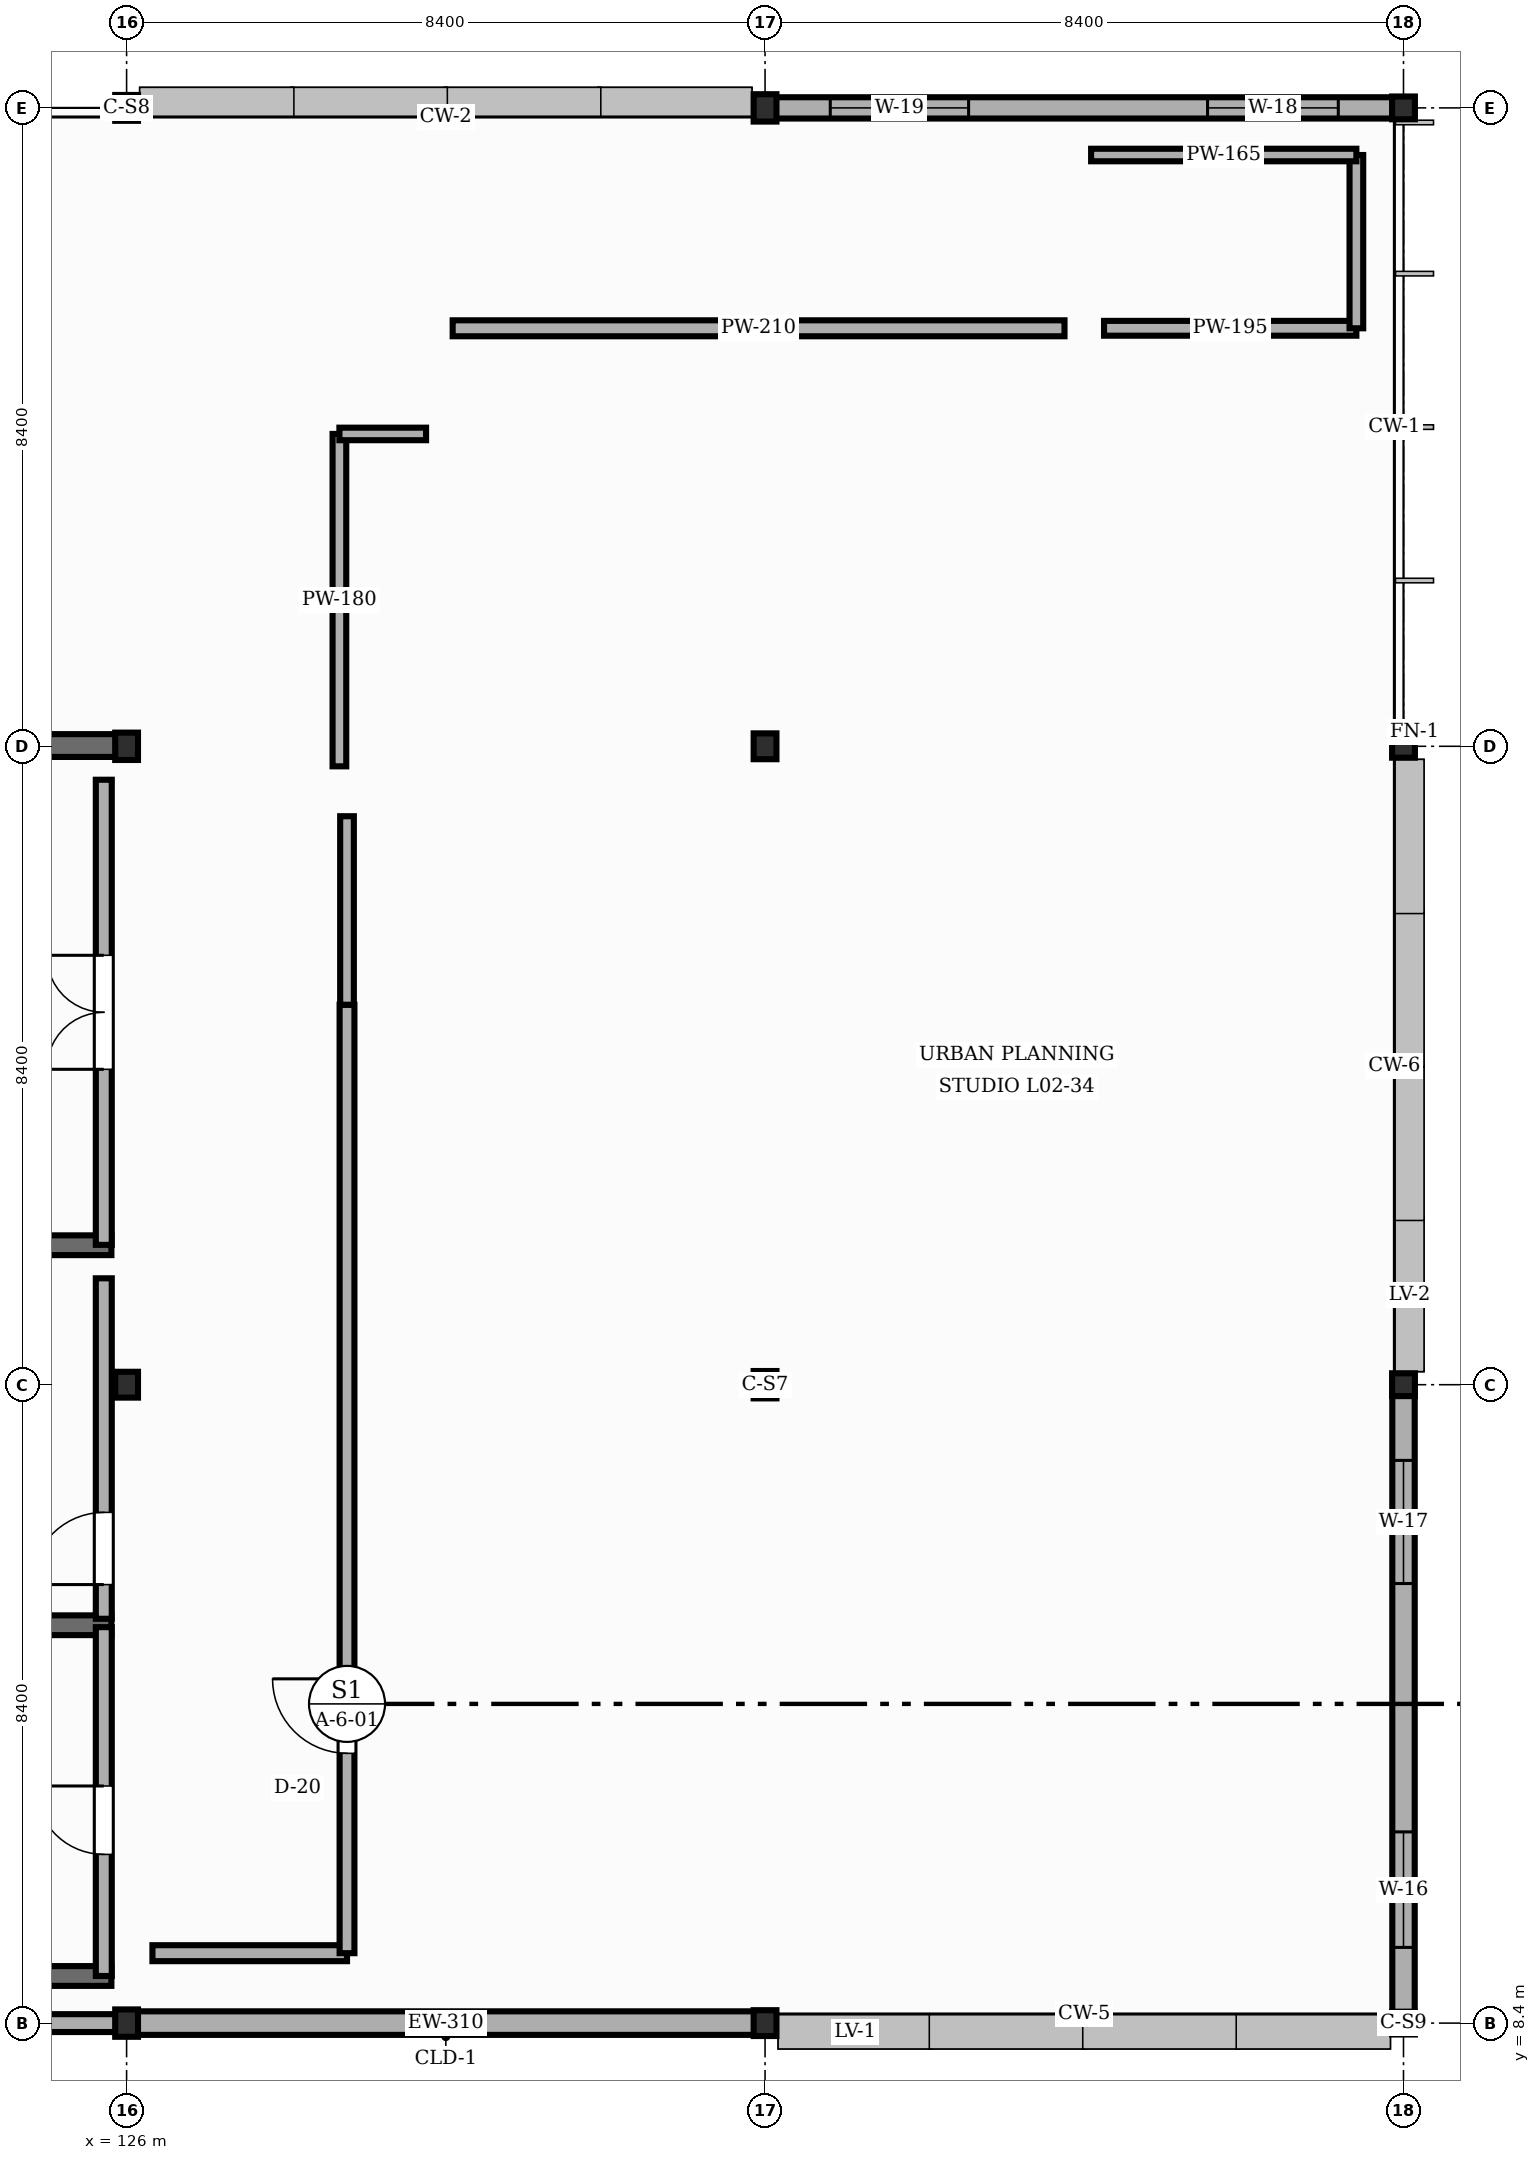
"""IFC4 building model, lengths in metres.
Left out: names, types, materials, properties, quantities, classifications, styles, units other than length and angle.
Written with IfcOpenShell. Run it as: python <this file> out.ifc"""

import sys

from ifc_helpers import new_model, si_unit, direction, frame, frame_2d, origin, origin_2d, place, context, subcontext, project, spatial, rectangle, i_section, extrude, element, fill, save


model = new_model("IFC4")
c1 = context("Model", 3, precision=1e-05, world=origin(), true_north=direction((0.0, 1.0)))
c2 = subcontext(c1, "Body", "Model", "MODEL_VIEW")
j1 = project(units=[si_unit("LENGTHUNIT", "METRE"), si_unit("PLANEANGLEUNIT", "RADIAN")], contexts=[c1])
p1 = place(None, origin())
s1 = spatial("IfcSite", under=j1, at=p1, CompositionType="ELEMENT")
p2 = place(p1, origin())
s2 = spatial("IfcBuilding", under=s1, at=p2, CompositionType="ELEMENT")
p3 = place(p2, frame((0.0, 0.0, 9.9)))
s3 = spatial("IfcBuildingStorey", under=s2, at=p3, CompositionType="ELEMENT", Elevation=9.9)
p4 = place(p3, frame((126.0, 8.4, 0.0), z_axis=(0.0, 0.0, 1.0), x_axis=(1.0, 0.0, 0.0)))
e1 = element("IfcColumn", 1, at=p4, inside=s3, PredefinedType="COLUMN", context=c2, shape_type="SweptSolid", body=[
    extrude(i_section(OverallWidth=0.3, OverallDepth=0.36, WebThickness=0.012, FlangeThickness=0.022, FilletRadius=0.027, at=origin_2d()), origin(), (0.0, 0.0, 1.0), 4.05),
])
p5 = place(p3, frame((126.0, 16.8, 0.0), z_axis=(0.0, 0.0, 1.0), x_axis=(1.0, 0.0, 0.0)))
e2 = element("IfcColumn", 2, at=p5, inside=s3, PredefinedType="COLUMN", context=c2, shape_type="SweptSolid", body=[
    extrude(i_section(OverallWidth=0.3, OverallDepth=0.34, WebThickness=0.012, FlangeThickness=0.021, FilletRadius=0.027, at=origin_2d()), origin(), (0.0, 0.0, 1.0), 4.05),
])
p6 = place(p3, frame((126.0, 25.2, 0.0), z_axis=(0.0, 0.0, 1.0), x_axis=(1.0, 0.0, 0.0)))
e3 = element("IfcColumn", 3, at=p6, inside=s3, PredefinedType="COLUMN", context=c2, shape_type="SweptSolid", body=[
    extrude(i_section(OverallWidth=0.3, OverallDepth=0.36, WebThickness=0.012, FlangeThickness=0.022, FilletRadius=0.027, at=origin_2d()), origin(), (0.0, 0.0, 1.0), 4.05),
])
for number, where, z_axis, x_axis in (
    (4, (126.0, 33.6, 0.0), (0.0, 0.0, 1.0), (1.0, 0.0, 0.0)),
    (5, (134.4, 8.4, 0.0), (0.0, 0.0, 1.0), (1.0, 0.0, 0.0)),
):
    element("IfcColumn", number, at=place(p3, frame(where, z_axis=z_axis, x_axis=x_axis)), inside=s3, PredefinedType="COLUMN", context=c2, shape_type="SweptSolid", body=[
        extrude(i_section(OverallWidth=0.3, OverallDepth=0.34, WebThickness=0.012, FlangeThickness=0.021, FilletRadius=0.027, at=origin_2d()), origin(), (0.0, 0.0, 1.0), 4.05),
    ])
p7 = place(p3, frame((134.4, 16.8, 0.0), z_axis=(0.0, 0.0, 1.0), x_axis=(1.0, 0.0, 0.0)))
e6 = element("IfcColumn", 6, at=p7, inside=s3, PredefinedType="COLUMN", context=c2, shape_type="SweptSolid", body=[
    extrude(i_section(OverallWidth=0.3, OverallDepth=0.36, WebThickness=0.012, FlangeThickness=0.022, FilletRadius=0.027, at=origin_2d()), origin(), (0.0, 0.0, 1.0), 4.05),
])
p8 = place(p3, frame((134.4, 25.2, 0.0), z_axis=(0.0, 0.0, 1.0), x_axis=(1.0, 0.0, 0.0)))
e7 = element("IfcColumn", 7, at=p8, inside=s3, PredefinedType="COLUMN", context=c2, shape_type="SweptSolid", body=[
    extrude(i_section(OverallWidth=0.3, OverallDepth=0.34, WebThickness=0.012, FlangeThickness=0.021, FilletRadius=0.027, at=origin_2d()), origin(), (0.0, 0.0, 1.0), 4.05),
])
p9 = place(p3, frame((134.4, 33.6, 0.0), z_axis=(0.0, 0.0, 1.0), x_axis=(1.0, 0.0, 0.0)))
e8 = element("IfcColumn", 8, at=p9, inside=s3, PredefinedType="COLUMN", context=c2, shape_type="SweptSolid", body=[
    extrude(i_section(OverallWidth=0.3, OverallDepth=0.36, WebThickness=0.012, FlangeThickness=0.022, FilletRadius=0.027, at=origin_2d()), origin(), (0.0, 0.0, 1.0), 4.05),
])
for number, where, z_axis, x_axis in (
    (9, (142.8, 8.4, 0.0), (0.0, 0.0, 1.0), (1.0, 0.0, 0.0)),
    (10, (142.8, 16.8, 0.0), (0.0, 0.0, 1.0), (1.0, 0.0, 0.0)),
    (11, (142.8, 25.2, 0.0), (0.0, 0.0, 1.0), (1.0, 0.0, 0.0)),
    (12, (142.8, 33.6, 0.0), (0.0, 0.0, 1.0), (1.0, 0.0, 0.0)),
):
    element("IfcColumn", number, at=place(p3, frame(where, z_axis=z_axis, x_axis=x_axis)), inside=s3, PredefinedType="COLUMN", context=c2, shape_type="SweptSolid", body=[
        extrude(i_section(OverallWidth=0.3, OverallDepth=0.3, WebThickness=0.011, FlangeThickness=0.019, FilletRadius=0.027, at=origin_2d()), origin(), (0.0, 0.0, 1.0), 4.05),
    ])
p10 = place(p3, frame((117.608, 8.4, 0.0), z_axis=(0.0, 0.0, 1.0), x_axis=(1.0, 0.0, 0.0)))
e13 = element("IfcWall", 13, at=p10, inside=s3, PredefinedType="STANDARD", context=c2, shape_type="SweptSolid", body=[
    extrude(rectangle(XDim=8.384, YDim=0.235, at=frame_2d((4.192, 0.0))), origin(), (0.0, 0.0, 1.0), 3.502),
])
p11 = place(p3, frame((126.008, 8.4, 0.0), z_axis=(0.0, 0.0, 1.0), x_axis=(1.0, 0.0, 0.0)))
e14 = element("IfcWall", 14, at=p11, inside=s3, PredefinedType="STANDARD", context=c2, shape_type="SweptSolid", body=[
    extrude(rectangle(XDim=8.384, YDim=0.31, at=frame_2d((4.192, 0.0))), origin(), (0.0, 0.0, 1.0), 3.472),
])
p12 = place(p3, frame((142.8, 8.546, 0.0), z_axis=(0.0, 0.0, 1.0), x_axis=(0.0, 1.0, 0.0)))
e15 = element("IfcWall", 15, at=p12, inside=s3, PredefinedType="STANDARD", context=c2, shape_type="SweptSolid", body=[
    extrude(rectangle(XDim=8.108, YDim=0.295, at=frame_2d((4.054, 0.0))), origin(), (0.0, 0.0, 1.0), 3.472),
])
p13 = place(p12, frame((0.85, 0.0, 0.9)))
e16 = element("IfcOpeningElement", 16, at=p13, cuts=e15, PredefinedType="OPENING", context=c2, shape_type="SweptSolid", body=[
    extrude(rectangle(XDim=1.52, YDim=1.25, at=frame_2d((0.76, 0.625))), frame((0.0, 0.157, 0.0), z_axis=(0.0, -1.0, 0.0), x_axis=(1.0, 0.0, 0.0)), (0.0, 0.0, 1.0), 0.315),
])
p14 = place(p12, frame((5.638, 0.0, 0.9)))
e17 = element("IfcOpeningElement", 17, at=p14, cuts=e15, PredefinedType="OPENING", context=c2, shape_type="SweptSolid", body=[
    extrude(rectangle(XDim=1.62, YDim=1.25, at=frame_2d((0.81, 0.625))), frame((0.0, 0.157, 0.0), z_axis=(0.0, -1.0, 0.0), x_axis=(1.0, 0.0, 0.0)), (0.0, 0.0, 1.0), 0.315),
])
p15 = place(p3, frame((142.792, 33.6, 0.0), z_axis=(0.0, 0.0, 1.0), x_axis=(-1.0, 0.0, 0.0)))
e18 = element("IfcWall", 18, at=p15, inside=s3, PredefinedType="STANDARD", context=c2, shape_type="SweptSolid", body=[
    extrude(rectangle(XDim=8.384, YDim=0.28, at=frame_2d((4.192, 0.0))), origin(), (0.0, 0.0, 1.0), 3.472),
])
p16 = place(p15, frame((0.85, 0.0, 0.9)))
e19 = element("IfcOpeningElement", 19, at=p16, cuts=e18, PredefinedType="OPENING", context=c2, shape_type="SweptSolid", body=[
    extrude(rectangle(XDim=1.72, YDim=1.25, at=frame_2d((0.86, 0.625))), frame((0.0, 0.15, 0.0), z_axis=(0.0, -1.0, 0.0), x_axis=(1.0, 0.0, 0.0)), (0.0, 0.0, 1.0), 0.3),
])
p17 = place(p15, frame((5.714, 0.0, 0.9)))
e20 = element("IfcOpeningElement", 20, at=p17, cuts=e18, PredefinedType="OPENING", context=c2, shape_type="SweptSolid", body=[
    extrude(rectangle(XDim=1.82, YDim=1.25, at=frame_2d((0.91, 0.625))), frame((0.0, 0.15, 0.0), z_axis=(0.0, -1.0, 0.0), x_axis=(1.0, 0.0, 0.0)), (0.0, 0.0, 1.0), 0.3),
])
for number, where, z_axis, x_axis in (
    (21, (122.765, 9.02, 0.0), (0.0, 0.0, 1.0), (1.0, 0.0, 0.0)),
    (22, (122.765, 13.635, 0.0), (0.0, 0.0, 1.0), (1.0, 0.0, 0.0)),
    (23, (122.765, 18.635, 0.0), (0.0, 0.0, 1.0), (1.0, 0.0, 0.0)),
):
    element("IfcWall", number, at=place(p3, frame(where, z_axis=z_axis, x_axis=x_axis)), inside=s3, PredefinedType="SHEAR", context=c2, shape_type="SweptSolid", body=[
        extrude(rectangle(XDim=3.035, YDim=0.26, at=frame_2d((1.518, 0.0))), origin(), (0.0, 0.0, 1.0), 3.84),
    ])
p18 = place(p3, frame((121.15, 25.21, 0.0), z_axis=(0.0, 0.0, 1.0), x_axis=(1.0, 0.0, 0.0)))
e24 = element("IfcWall", 24, at=p18, inside=s3, PredefinedType="SHEAR", context=c2, shape_type="SweptSolid", body=[
    extrude(rectangle(XDim=4.87, YDim=0.3, at=frame_2d((2.435, 0.0))), origin(), (0.0, 0.0, 1.0), 3.84),
])
p19 = place(p3, frame((125.7, 9.02, 0.0), z_axis=(0.0, 0.0, 1.0), x_axis=(0.0, 1.0, 0.0)))
e25 = element("IfcWall", 25, at=p19, inside=s3, PredefinedType="STANDARD", context=c2, shape_type="SweptSolid", body=[
    extrude(rectangle(XDim=4.59, YDim=0.21, at=frame_2d((2.295, 0.0))), origin(), (0.0, 0.0, 1.0), 3.232),
])
p20 = place(p19, frame((1.6, 0.0, 0.0)))
e26 = element("IfcOpeningElement", 26, at=p20, cuts=e25, PredefinedType="OPENING", context=c2, shape_type="SweptSolid", body=[
    extrude(rectangle(XDim=0.9, YDim=2.1, at=frame_2d((0.45, 1.05))), frame((0.0, 0.115, 0.0), z_axis=(0.0, -1.0, 0.0), x_axis=(1.0, 0.0, 0.0)), (0.0, 0.0, 1.0), 0.23),
])
p21 = place(p3, frame((125.7, 13.72, 0.0), z_axis=(0.0, 0.0, 1.0), x_axis=(0.0, 1.0, 0.0)))
e27 = element("IfcWall", 27, at=p21, inside=s3, PredefinedType="STANDARD", context=c2, shape_type="SweptSolid", body=[
    extrude(rectangle(XDim=4.48, YDim=0.21, at=frame_2d((2.24, 0.0))), origin(), (0.0, 0.0, 1.0), 3.232),
])
p22 = place(p21, frame((0.45, 0.0, 0.0)))
e28 = element("IfcOpeningElement", 28, at=p22, cuts=e27, PredefinedType="OPENING", context=c2, shape_type="SweptSolid", body=[
    extrude(rectangle(XDim=0.95, YDim=2.15, at=frame_2d((0.475, 1.075))), frame((0.0, 0.115, 0.0), z_axis=(0.0, -1.0, 0.0), x_axis=(1.0, 0.0, 0.0)), (0.0, 0.0, 1.0), 0.23),
])
p23 = place(p3, frame((125.7, 18.64, 0.0), z_axis=(0.0, 0.0, 1.0), x_axis=(0.0, 1.0, 0.0)))
e29 = element("IfcWall", 29, at=p23, inside=s3, PredefinedType="STANDARD", context=c2, shape_type="SweptSolid", body=[
    extrude(rectangle(XDim=6.12, YDim=0.21, at=frame_2d((3.06, 0.0))), origin(), (0.0, 0.0, 1.0), 3.342),
])
p24 = place(p23, frame((2.31, 0.0, 0.0)))
e30 = element("IfcOpeningElement", 30, at=p24, cuts=e29, PredefinedType="OPENING", context=c2, shape_type="SweptSolid", body=[
    extrude(rectangle(XDim=1.5, YDim=2.2, at=frame_2d((0.75, 1.1))), frame((0.0, 0.115, 0.0), z_axis=(0.0, -1.0, 0.0), x_axis=(1.0, 0.0, 0.0)), (0.0, 0.0, 1.0), 0.23),
])
p25 = place(p3, frame((128.8, 24.936, -0.004), z_axis=(0.0, 0.0, 1.0), x_axis=(0.0, 1.0, 0.0)))
e31 = element("IfcWall", 31, at=p25, inside=s3, PredefinedType="STANDARD", context=c2, shape_type="SweptSolid", body=[
    extrude(rectangle(XDim=4.374, YDim=0.18, at=frame_2d((2.187, 0.0))), origin(), (0.0, 0.0, 1.0), 3.596),
])
p26 = place(p3, frame((128.8, 29.31, -0.004), z_axis=(0.0, 0.0, 1.0), x_axis=(1.0, 0.0, 0.0)))
e32 = element("IfcWall", 32, at=p26, inside=s3, PredefinedType="STANDARD", context=c2, shape_type="SweptSolid", body=[
    extrude(rectangle(XDim=1.14, YDim=0.165, at=frame_2d((0.57, 0.0))), origin(), (0.0, 0.0, 1.0), 3.844),
])
p27 = place(p3, frame((130.29, 30.7, -0.004), z_axis=(0.0, 0.0, 1.0), x_axis=(1.0, 0.0, 0.0)))
e33 = element("IfcWall", 33, at=p27, inside=s3, PredefinedType="STANDARD", context=c2, shape_type="SweptSolid", body=[
    extrude(rectangle(XDim=8.05, YDim=0.21, at=frame_2d((4.025, 0.0))), origin(), (0.0, 0.0, 1.0), 3.844),
])
p28 = place(p3, frame((138.86, 30.7, -0.004), z_axis=(0.0, 0.0, 1.0), x_axis=(1.0, 0.0, 0.0)))
e34 = element("IfcWall", 34, at=p28, inside=s3, PredefinedType="STANDARD", context=c2, shape_type="SweptSolid", body=[
    extrude(rectangle(XDim=3.32, YDim=0.195, at=frame_2d((1.66, 0.0))), origin(), (0.0, 0.0, 1.0), 3.844),
])
p29 = place(p3, frame((142.18, 30.7, -0.004), z_axis=(0.0, 0.0, 1.0), x_axis=(0.0, 1.0, 0.0)))
e35 = element("IfcWall", 35, at=p29, inside=s3, PredefinedType="STANDARD", context=c2, shape_type="SweptSolid", body=[
    extrude(rectangle(XDim=2.28, YDim=0.18, at=frame_2d((1.14, 0.0))), origin(), (0.0, 0.0, 1.0), 3.844),
])
p30 = place(p3, frame((142.18, 32.98, -0.004), z_axis=(0.0, 0.0, 1.0), x_axis=(-1.0, 0.0, 0.0)))
e36 = element("IfcWall", 36, at=p30, inside=s3, PredefinedType="STANDARD", context=c2, shape_type="SweptSolid", body=[
    extrude(rectangle(XDim=3.49, YDim=0.165, at=frame_2d((1.745, 0.0))), origin(), (0.0, 0.0, 1.0), 3.844),
])
p31 = place(p3, frame((126.34, 9.32, -0.004), z_axis=(0.0, 0.0, 1.0), x_axis=(1.0, 0.0, 0.0)))
e37 = element("IfcWall", 37, at=p31, inside=s3, PredefinedType="STANDARD", context=c2, shape_type="SweptSolid", body=[
    extrude(rectangle(XDim=2.56, YDim=0.21, at=frame_2d((1.28, 0.0))), origin(), (0.0, 0.0, 1.0), 3.844),
])
p32 = place(p3, frame((128.9, 9.32, -0.004), z_axis=(0.0, 0.0, 1.0), x_axis=(0.0, 1.0, 0.0)))
e38 = element("IfcWall", 38, at=p32, inside=s3, PredefinedType="STANDARD", context=c2, shape_type="SweptSolid", body=[
    extrude(rectangle(XDim=12.479, YDim=0.195, at=frame_2d((6.24, 0.0))), origin(), (0.0, 0.0, 1.0), 3.536),
])
p33 = place(p32, frame((2.63, 0.0, 0.0)))
e39 = element("IfcOpeningElement", 39, at=p33, cuts=e38, PredefinedType="OPENING", context=c2, shape_type="SweptSolid", body=[
    extrude(rectangle(XDim=0.98, YDim=2.22, at=frame_2d((0.49, 1.11))), frame((0.0, 0.107, 0.0), z_axis=(0.0, -1.0, 0.0), x_axis=(1.0, 0.0, 0.0)), (0.0, 0.0, 1.0), 0.215),
])
p34 = place(p3, frame((128.9, 21.799, -0.004), z_axis=(0.0, 0.0, 1.0), x_axis=(0.0, 1.0, 0.0)))
e40 = element("IfcWall", 40, at=p34, inside=s3, PredefinedType="STANDARD", context=c2, shape_type="SweptSolid", body=[
    extrude(rectangle(XDim=2.481, YDim=0.18, at=frame_2d((1.24, 0.0))), origin(), (0.0, 0.0, 1.0), 3.566),
])
p35 = place(p13, origin())
e41 = element("IfcWindow", 41, at=p35, inside=s3, PartitioningType="SINGLE_PANEL", PredefinedType="WINDOW", context=c2, shape_type="SweptSolid", body=[
    extrude(rectangle(XDim=1.52, YDim=1.25, at=frame_2d((0.76, 0.625))), frame((0.0, 0.03, 0.0), z_axis=(0.0, -1.0, 0.0), x_axis=(1.0, 0.0, 0.0)), (0.0, 0.0, 1.0), 0.06),
])
fill(e16, e41)
p36 = place(p14, origin())
e42 = element("IfcWindow", 42, at=p36, inside=s3, PartitioningType="SINGLE_PANEL", PredefinedType="WINDOW", context=c2, shape_type="SweptSolid", body=[
    extrude(rectangle(XDim=1.62, YDim=1.25, at=frame_2d((0.81, 0.625))), frame((0.0, 0.03, 0.0), z_axis=(0.0, -1.0, 0.0), x_axis=(1.0, 0.0, 0.0)), (0.0, 0.0, 1.0), 0.06),
])
fill(e17, e42)
p37 = place(p16, origin())
e43 = element("IfcWindow", 43, at=p37, inside=s3, PartitioningType="SINGLE_PANEL", PredefinedType="WINDOW", context=c2, shape_type="SweptSolid", body=[
    extrude(rectangle(XDim=1.72, YDim=1.25, at=frame_2d((0.86, 0.625))), frame((0.0, 0.03, 0.0), z_axis=(0.0, -1.0, 0.0), x_axis=(1.0, 0.0, 0.0)), (0.0, 0.0, 1.0), 0.06),
])
fill(e19, e43)
p38 = place(p17, origin())
e44 = element("IfcWindow", 44, at=p38, inside=s3, PartitioningType="SINGLE_PANEL", PredefinedType="WINDOW", context=c2, shape_type="SweptSolid", body=[
    extrude(rectangle(XDim=1.82, YDim=1.25, at=frame_2d((0.91, 0.625))), frame((0.0, 0.03, 0.0), z_axis=(0.0, -1.0, 0.0), x_axis=(1.0, 0.0, 0.0)), (0.0, 0.0, 1.0), 0.06),
])
fill(e20, e44)
p39 = place(p20, origin())
e45 = element("IfcDoor", 45, at=p39, inside=s3, OperationType="SINGLE_SWING_RIGHT", PredefinedType="DOOR", context=c2, shape_type="SweptSolid", body=[
    extrude(rectangle(XDim=0.9, YDim=2.1, at=frame_2d((0.45, 1.05))), frame((0.0, 0.025, 0.0), z_axis=(0.0, -1.0, 0.0), x_axis=(1.0, 0.0, 0.0)), (0.0, 0.0, 1.0), 0.05),
])
fill(e26, e45)
p40 = place(p22, origin())
e46 = element("IfcDoor", 46, at=p40, inside=s3, OperationType="SINGLE_SWING_LEFT", PredefinedType="DOOR", context=c2, shape_type="SweptSolid", body=[
    extrude(rectangle(XDim=0.95, YDim=2.15, at=frame_2d((0.475, 1.075))), frame((0.0, 0.025, 0.0), z_axis=(0.0, -1.0, 0.0), x_axis=(1.0, 0.0, 0.0)), (0.0, 0.0, 1.0), 0.05),
])
fill(e28, e46)
p41 = place(p24, origin())
e47 = element("IfcDoor", 47, at=p41, inside=s3, OperationType="DOUBLE_DOOR_SINGLE_SWING", PredefinedType="DOOR", context=c2, shape_type="SweptSolid", body=[
    extrude(rectangle(XDim=1.5, YDim=2.2, at=frame_2d((0.75, 1.1))), frame((0.0, 0.025, 0.0), z_axis=(0.0, -1.0, 0.0), x_axis=(1.0, 0.0, 0.0)), (0.0, 0.0, 1.0), 0.05),
])
fill(e30, e47)
p42 = place(p33, origin())
e48 = element("IfcDoor", 48, at=p42, inside=s3, OperationType="SINGLE_SWING_RIGHT", PredefinedType="DOOR", context=c2, shape_type="SweptSolid", body=[
    extrude(rectangle(XDim=0.98, YDim=2.22, at=frame_2d((0.49, 1.11))), frame((0.0, 0.025, 0.0), z_axis=(0.0, -1.0, 0.0), x_axis=(1.0, 0.0, 0.0)), (0.0, 0.0, 1.0), 0.05),
])
fill(e39, e48)
save(model, sys.argv[1])
